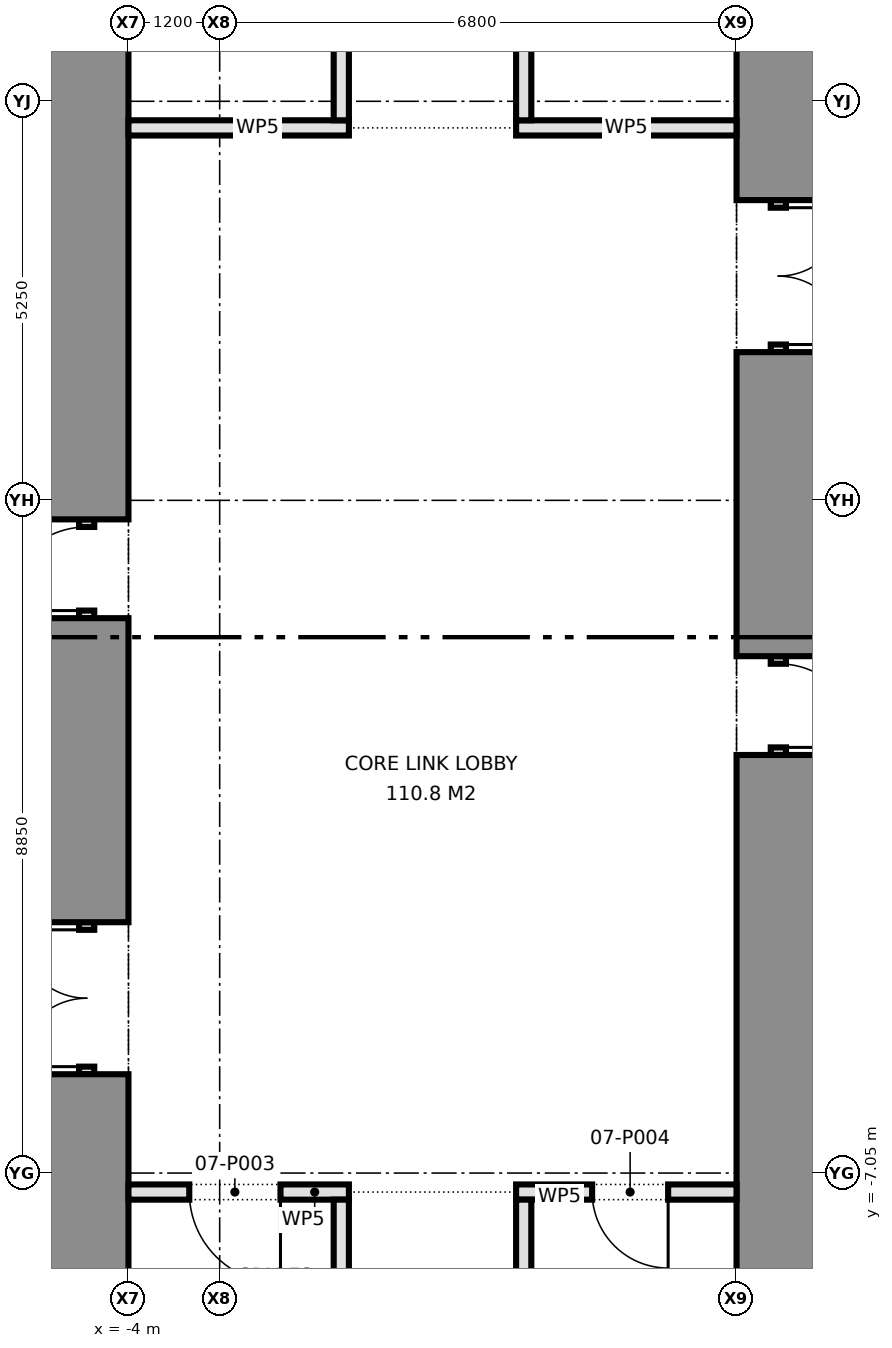
"""IFC4 building model, lengths in metres.
Left out: names, types, materials, properties, quantities, classifications, styles, units other than length and angle.
Written with IfcOpenShell. Run it as: python <this file> out.ifc"""

import sys

from ifc_helpers import new_model, si_unit, direction, frame, frame_2d, origin, place, context, subcontext, project, spatial, rectangle, extrude, element, fill, save


model = new_model("IFC4")
c1 = context("Model", 3, precision=1e-05, world=origin(), true_north=direction((0.0, 1.0)))
c2 = subcontext(c1, "Body", "Model", "MODEL_VIEW")
j1 = project(units=[si_unit("LENGTHUNIT", "METRE"), si_unit("PLANEANGLEUNIT", "RADIAN")], contexts=[c1])
p1 = place(None, origin())
s1 = spatial("IfcSite", under=j1, at=p1, CompositionType="ELEMENT")
p2 = place(p1, origin())
s2 = spatial("IfcBuilding", under=s1, at=p2, CompositionType="ELEMENT")
p3 = place(p2, frame((0.0, 0.0, 30.5)))
s3 = spatial("IfcBuildingStorey", under=s2, at=p3, CompositionType="ELEMENT", Elevation=30.5)
p4 = place(p3, frame((-4.55, -8.9, 0.0), z_axis=(0.0, 0.0, 1.0), x_axis=(0.0, 1.0, 0.0)))
e1 = element("IfcWall", 1, at=p4, inside=s3, PredefinedType="SHEAR", context=c2, shape_type="SweptSolid", body=[
    extrude(rectangle(XDim=3.15, YDim=1.1, at=frame_2d((1.575, 0.0))), origin(), (0.0, 0.0, 1.0), 4.575),
])
p5 = place(p3, frame((-4.55, -5.75, 0.0), z_axis=(0.0, 0.0, 1.0), x_axis=(0.0, 1.0, 0.0)))
e2 = element("IfcWall", 2, at=p5, inside=s3, PredefinedType="PARTITIONING", context=c2, shape_type="SweptSolid", body=[
    extrude(rectangle(XDim=2.0, YDim=0.2, at=frame_2d((1.0, 0.0))), origin(), (0.0, 0.0, 1.0), 2.4),
])
p6 = place(p5, frame((0.1, 0.0, 0.0)))
e3 = element("IfcOpeningElement", 3, at=p6, cuts=e2, PredefinedType="OPENING", context=c2, shape_type="SweptSolid", body=[
    extrude(rectangle(XDim=1.8, YDim=2.1, at=frame_2d((0.9, 1.05))), frame((0.0, 0.11, 0.0), z_axis=(0.0, -1.0, 0.0), x_axis=(1.0, 0.0, 0.0)), (0.0, 0.0, 1.0), 0.22),
])
p7 = place(p3, frame((-4.55, -3.75, 0.0), z_axis=(0.0, 0.0, 1.0), x_axis=(0.0, 1.0, 0.0)))
e4 = element("IfcWall", 4, at=p7, inside=s3, PredefinedType="SHEAR", context=c2, shape_type="SweptSolid", body=[
    extrude(rectangle(XDim=4.0, YDim=1.1, at=frame_2d((2.0, 0.0))), origin(), (0.0, 0.0, 1.0), 4.575),
])
p8 = place(p3, frame((-4.55, 0.25, 0.0), z_axis=(0.0, 0.0, 1.0), x_axis=(0.0, 1.0, 0.0)))
e5 = element("IfcWall", 5, at=p8, inside=s3, PredefinedType="PARTITIONING", context=c2, shape_type="SweptSolid", body=[
    extrude(rectangle(XDim=1.3, YDim=0.2, at=frame_2d((0.65, 0.0))), origin(), (0.0, 0.0, 1.0), 2.4),
])
p9 = place(p8, frame((0.1, 0.0, 0.0)))
e6 = element("IfcOpeningElement", 6, at=p9, cuts=e5, PredefinedType="OPENING", context=c2, shape_type="SweptSolid", body=[
    extrude(rectangle(XDim=1.1, YDim=2.1, at=frame_2d((0.55, 1.05))), frame((0.0, 0.11, 0.0), z_axis=(0.0, -1.0, 0.0), x_axis=(1.0, 0.0, 0.0)), (0.0, 0.0, 1.0), 0.22),
])
p10 = place(p3, frame((-4.55, 1.55, 0.0), z_axis=(0.0, 0.0, 1.0), x_axis=(0.0, 1.0, 0.0)))
e7 = element("IfcWall", 7, at=p10, inside=s3, PredefinedType="SHEAR", context=c2, shape_type="SweptSolid", body=[
    extrude(rectangle(XDim=7.35, YDim=1.1, at=frame_2d((3.675, 0.0))), origin(), (0.0, 0.0, 1.0), 4.575),
])
p11 = place(p3, frame((4.55, 8.9, 0.0), z_axis=(0.0, 0.0, 1.0), x_axis=(0.0, -1.0, 0.0)))
e8 = element("IfcWall", 8, at=p11, inside=s3, PredefinedType="SHEAR", context=c2, shape_type="SweptSolid", body=[
    extrude(rectangle(XDim=3.15, YDim=1.1, at=frame_2d((1.575, 0.0))), origin(), (0.0, 0.0, 1.0), 4.575),
])
p12 = place(p3, frame((4.55, 5.75, 0.0), z_axis=(0.0, 0.0, 1.0), x_axis=(0.0, -1.0, 0.0)))
e9 = element("IfcWall", 9, at=p12, inside=s3, PredefinedType="PARTITIONING", context=c2, shape_type="SweptSolid", body=[
    extrude(rectangle(XDim=2.0, YDim=0.2, at=frame_2d((1.0, 0.0))), origin(), (0.0, 0.0, 1.0), 2.4),
])
p13 = place(p12, frame((0.1, 0.0, 0.0)))
e10 = element("IfcOpeningElement", 10, at=p13, cuts=e9, PredefinedType="OPENING", context=c2, shape_type="SweptSolid", body=[
    extrude(rectangle(XDim=1.8, YDim=2.1, at=frame_2d((0.9, 1.05))), frame((0.0, 0.11, 0.0), z_axis=(0.0, -1.0, 0.0), x_axis=(1.0, 0.0, 0.0)), (0.0, 0.0, 1.0), 0.22),
])
p14 = place(p3, frame((4.55, 3.75, 0.0), z_axis=(0.0, 0.0, 1.0), x_axis=(0.0, -1.0, 0.0)))
e11 = element("IfcWall", 11, at=p14, inside=s3, PredefinedType="SHEAR", context=c2, shape_type="SweptSolid", body=[
    extrude(rectangle(XDim=4.0, YDim=1.1, at=frame_2d((2.0, 0.0))), origin(), (0.0, 0.0, 1.0), 4.575),
])
p15 = place(p3, frame((4.55, -0.25, 0.0), z_axis=(0.0, 0.0, 1.0), x_axis=(0.0, -1.0, 0.0)))
e12 = element("IfcWall", 12, at=p15, inside=s3, PredefinedType="PARTITIONING", context=c2, shape_type="SweptSolid", body=[
    extrude(rectangle(XDim=1.3, YDim=0.2, at=frame_2d((0.65, 0.0))), origin(), (0.0, 0.0, 1.0), 2.4),
])
p16 = place(p15, frame((0.1, 0.0, 0.0)))
e13 = element("IfcOpeningElement", 13, at=p16, cuts=e12, PredefinedType="OPENING", context=c2, shape_type="SweptSolid", body=[
    extrude(rectangle(XDim=1.1, YDim=2.1, at=frame_2d((0.55, 1.05))), frame((0.0, 0.11, 0.0), z_axis=(0.0, -1.0, 0.0), x_axis=(1.0, 0.0, 0.0)), (0.0, 0.0, 1.0), 0.22),
])
p17 = place(p3, frame((4.55, -1.55, 0.0), z_axis=(0.0, 0.0, 1.0), x_axis=(0.0, -1.0, 0.0)))
e14 = element("IfcWall", 14, at=p17, inside=s3, PredefinedType="SHEAR", context=c2, shape_type="SweptSolid", body=[
    extrude(rectangle(XDim=7.35, YDim=1.1, at=frame_2d((3.675, 0.0))), origin(), (0.0, 0.0, 1.0), 4.575),
])
p18 = place(p3, frame((-4.0, -7.3, 0.0), z_axis=(0.0, 0.0, 1.0), x_axis=(1.0, 0.0, 0.0)))
e15 = element("IfcWall", 15, at=p18, inside=s3, PredefinedType="PARTITIONING", context=c2, shape_type="SweptSolid", body=[
    extrude(rectangle(XDim=2.9, YDim=0.2, at=frame_2d((1.45, 0.0))), origin(), (0.0, 0.0, 1.0), 4.575),
])
p19 = place(p18, frame((0.8, 0.0, 0.0)))
e16 = element("IfcOpeningElement", 16, at=p19, cuts=e15, PredefinedType="OPENING", context=c2, shape_type="SweptSolid", body=[
    extrude(rectangle(XDim=1.2, YDim=2.1, at=frame_2d((0.6, 1.05))), frame((0.0, 0.11, 0.0), z_axis=(0.0, -1.0, 0.0), x_axis=(1.0, 0.0, 0.0)), (0.0, 0.0, 1.0), 0.22),
])
p20 = place(p3, frame((1.1, -7.3, 0.0), z_axis=(0.0, 0.0, 1.0), x_axis=(1.0, 0.0, 0.0)))
e17 = element("IfcWall", 17, at=p20, inside=s3, PredefinedType="PARTITIONING", context=c2, shape_type="SweptSolid", body=[
    extrude(rectangle(XDim=2.9, YDim=0.2, at=frame_2d((1.45, 0.0))), origin(), (0.0, 0.0, 1.0), 4.575),
])
p21 = place(p20, frame((1.0, 0.0, 0.0)))
e18 = element("IfcOpeningElement", 18, at=p21, cuts=e17, PredefinedType="OPENING", context=c2, shape_type="SweptSolid", body=[
    extrude(rectangle(XDim=1.0, YDim=2.1, at=frame_2d((0.5, 1.05))), frame((0.0, 0.11, 0.0), z_axis=(0.0, -1.0, 0.0), x_axis=(1.0, 0.0, 0.0)), (0.0, 0.0, 1.0), 0.22),
])
for number, where, z_axis, x_axis in (
    (19, (-4.0, 6.7, 0.0), (0.0, 0.0, 1.0), (1.0, 0.0, 0.0)),
    (20, (1.1, 6.7, 0.0), (0.0, 0.0, 1.0), (1.0, 0.0, 0.0)),
):
    element("IfcWall", number, at=place(p3, frame(where, z_axis=z_axis, x_axis=x_axis)), inside=s3, PredefinedType="PARTITIONING", context=c2, shape_type="SweptSolid", body=[
        extrude(rectangle(XDim=2.9, YDim=0.2, at=frame_2d((1.45, 0.0))), origin(), (0.0, 0.0, 1.0), 4.575),
    ])
p22 = place(p3, frame((1.2, -9.9, 0.0), z_axis=(0.0, 0.0, 1.0), x_axis=(0.0, 1.0, 0.0)))
e21 = element("IfcWall", 21, at=p22, inside=s3, PredefinedType="PARTITIONING", context=c2, shape_type="SweptSolid", body=[
    extrude(rectangle(XDim=2.5, YDim=0.2, at=frame_2d((1.25, 0.0))), origin(), (0.0, 0.0, 1.0), 4.575),
])
p23 = place(p3, frame((1.2, 6.8, 0.0), z_axis=(0.0, 0.0, 1.0), x_axis=(0.0, 1.0, 0.0)))
e22 = element("IfcWall", 22, at=p23, inside=s3, PredefinedType="PARTITIONING", context=c2, shape_type="SweptSolid", body=[
    extrude(rectangle(XDim=3.1, YDim=0.2, at=frame_2d((1.55, 0.0))), origin(), (0.0, 0.0, 1.0), 4.575),
])
p24 = place(p23, frame((0.95, 0.0, 0.0)))
e23 = element("IfcOpeningElement", 23, at=p24, cuts=e22, PredefinedType="OPENING", context=c2, shape_type="SweptSolid", body=[
    extrude(rectangle(XDim=1.2, YDim=2.1, at=frame_2d((0.6, 1.05))), frame((0.0, 0.11, 0.0), z_axis=(0.0, -1.0, 0.0), x_axis=(1.0, 0.0, 0.0)), (0.0, 0.0, 1.0), 0.22),
])
p25 = place(p3, frame((-1.2, -9.9, 0.0), z_axis=(0.0, 0.0, 1.0), x_axis=(0.0, 1.0, 0.0)))
e24 = element("IfcWall", 24, at=p25, inside=s3, PredefinedType="PARTITIONING", context=c2, shape_type="SweptSolid", body=[
    extrude(rectangle(XDim=2.5, YDim=0.2, at=frame_2d((1.25, 0.0))), origin(), (0.0, 0.0, 1.0), 4.575),
])
p26 = place(p3, frame((-1.2, 6.8, 0.0), z_axis=(0.0, 0.0, 1.0), x_axis=(0.0, 1.0, 0.0)))
e25 = element("IfcWall", 25, at=p26, inside=s3, PredefinedType="PARTITIONING", context=c2, shape_type="SweptSolid", body=[
    extrude(rectangle(XDim=3.1, YDim=0.2, at=frame_2d((1.55, 0.0))), origin(), (0.0, 0.0, 1.0), 4.575),
])
p27 = place(p26, frame((1.05, 0.0, 0.0)))
e26 = element("IfcOpeningElement", 26, at=p27, cuts=e25, PredefinedType="OPENING", context=c2, shape_type="SweptSolid", body=[
    extrude(rectangle(XDim=1.0, YDim=2.1, at=frame_2d((0.5, 1.05))), frame((0.0, 0.11, 0.0), z_axis=(0.0, -1.0, 0.0), x_axis=(1.0, 0.0, 0.0)), (0.0, 0.0, 1.0), 0.22),
])
p28 = place(p6, origin())
e27 = element("IfcDoor", 27, at=p28, inside=s3, OperationType="DOUBLE_DOOR_SINGLE_SWING", PredefinedType="DOOR", context=c2, shape_type="SweptSolid", body=[
    extrude(rectangle(XDim=1.8, YDim=2.1, at=frame_2d((0.9, 1.05))), frame((0.0, 0.025, 0.0), z_axis=(0.0, -1.0, 0.0), x_axis=(1.0, 0.0, 0.0)), (0.0, 0.0, 1.0), 0.05),
])
fill(e3, e27)
p29 = place(p9, origin())
e28 = element("IfcDoor", 28, at=p29, inside=s3, OperationType="SINGLE_SWING_LEFT", PredefinedType="DOOR", context=c2, shape_type="SweptSolid", body=[
    extrude(rectangle(XDim=1.1, YDim=2.1, at=frame_2d((0.55, 1.05))), frame((0.0, 0.025, 0.0), z_axis=(0.0, -1.0, 0.0), x_axis=(1.0, 0.0, 0.0)), (0.0, 0.0, 1.0), 0.05),
])
fill(e6, e28)
p30 = place(p13, origin())
e29 = element("IfcDoor", 29, at=p30, inside=s3, OperationType="DOUBLE_DOOR_SINGLE_SWING", PredefinedType="DOOR", context=c2, shape_type="SweptSolid", body=[
    extrude(rectangle(XDim=1.8, YDim=2.1, at=frame_2d((0.9, 1.05))), frame((0.0, 0.025, 0.0), z_axis=(0.0, -1.0, 0.0), x_axis=(1.0, 0.0, 0.0)), (0.0, 0.0, 1.0), 0.05),
])
fill(e10, e29)
p31 = place(p16, origin())
e30 = element("IfcDoor", 30, at=p31, inside=s3, OperationType="SINGLE_SWING_RIGHT", PredefinedType="DOOR", context=c2, shape_type="SweptSolid", body=[
    extrude(rectangle(XDim=1.1, YDim=2.1, at=frame_2d((0.55, 1.05))), frame((0.0, 0.025, 0.0), z_axis=(0.0, -1.0, 0.0), x_axis=(1.0, 0.0, 0.0)), (0.0, 0.0, 1.0), 0.05),
])
fill(e13, e30)
p32 = place(p19, frame((1.2, 0.0, 0.0), z_axis=(0.0, 0.0, 1.0), x_axis=(-1.0, 0.0, 0.0)))
e31 = element("IfcDoor", 31, at=p32, inside=s3, OperationType="SINGLE_SWING_LEFT", PredefinedType="DOOR", context=c2, shape_type="SweptSolid", body=[
    extrude(rectangle(XDim=1.2, YDim=2.1, at=frame_2d((0.6, 1.05))), frame((0.0, 0.025, 0.0), z_axis=(0.0, -1.0, 0.0), x_axis=(1.0, 0.0, 0.0)), (0.0, 0.0, 1.0), 0.05),
])
fill(e16, e31)
p33 = place(p21, frame((1.0, 0.0, 0.0), z_axis=(0.0, 0.0, 1.0), x_axis=(-1.0, 0.0, 0.0)))
e32 = element("IfcDoor", 32, at=p33, inside=s3, OperationType="SINGLE_SWING_LEFT", PredefinedType="DOOR", context=c2, shape_type="SweptSolid", body=[
    extrude(rectangle(XDim=1.0, YDim=2.1, at=frame_2d((0.5, 1.05))), frame((0.0, 0.025, 0.0), z_axis=(0.0, -1.0, 0.0), x_axis=(1.0, 0.0, 0.0)), (0.0, 0.0, 1.0), 0.05),
])
fill(e18, e32)
save(model, sys.argv[1])
